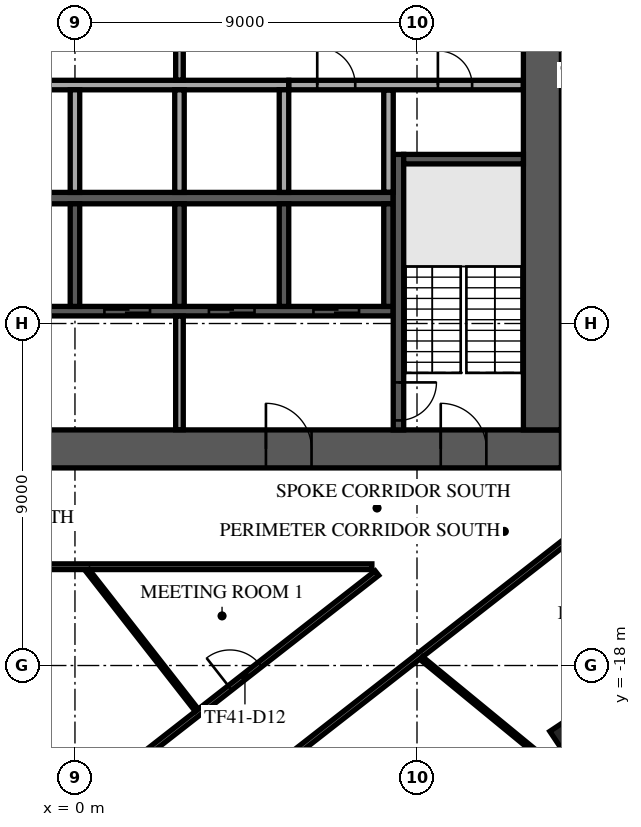
"""IFC4 building model, lengths in metres.
Left out: names, types, materials, properties, quantities, classifications, styles, units other than length and angle.
Written with IfcOpenShell. Run it as: python <this file> out.ifc"""

import sys

from ifc_helpers import new_model, si_unit, direction, frame, frame_2d, origin, origin_2d, place, context, subcontext, project, spatial, rectangle, extrude, element, fill, save


model = new_model("IFC4")
c1 = context("Model", 3, precision=1e-05, world=origin(), true_north=direction((0.0, 1.0)))
c2 = subcontext(c1, "Body", "Model", "MODEL_VIEW")
j1 = project(units=[si_unit("LENGTHUNIT", "METRE"), si_unit("PLANEANGLEUNIT", "RADIAN")], contexts=[c1])
p1 = place(None, origin())
s1 = spatial("IfcSite", under=j1, at=p1, CompositionType="ELEMENT")
p2 = place(p1, origin())
s2 = spatial("IfcBuilding", under=s1, at=p2, CompositionType="ELEMENT")
p3 = place(p2, frame((0.0, 0.0, 175.7)))
s3 = spatial("IfcBuildingStorey", under=s2, at=p3, CompositionType="ELEMENT", Elevation=175.7)
p4 = place(p3, frame((13.258, -19.885, 0.0), z_axis=(0.0, 0.0, 1.0), x_axis=(0.832028680356, 0.55473261583, 0.0)))
e1 = element("IfcColumn", 1, at=p4, inside=s3, PredefinedType="COLUMN", context=c2, shape_type="SweptSolid", body=[
    extrude(rectangle(XDim=1.1, YDim=1.1, at=origin_2d()), origin(), (0.0, 0.0, 1.0), 4.0),
])
p5 = place(p3, frame((-12.8, -12.3, 0.0), z_axis=(0.0, 0.0, 1.0), x_axis=(1.0, 0.0, 0.0)))
e2 = element("IfcWall", 2, at=p5, inside=s3, PredefinedType="SHEAR", context=c2, shape_type="SweptSolid", body=[
    extrude(rectangle(XDim=25.6, YDim=1.0, at=frame_2d((12.8, 0.0))), origin(), (0.0, 0.0, 1.0), 3.6),
])
p6 = place(p5, frame((7.7, 0.0, 0.0)))
e3 = element("IfcOpeningElement", 3, at=p6, cuts=e2, PredefinedType="OPENING", context=c2, shape_type="SweptSolid", body=[
    extrude(rectangle(XDim=2.0, YDim=2.1, at=frame_2d((1.0, 1.05))), frame((0.0, 0.51, 0.0), z_axis=(0.0, -1.0, 0.0), x_axis=(1.0, 0.0, 0.0)), (0.0, 0.0, 1.0), 1.02),
])
p7 = place(p5, frame((17.825, 0.0, 0.0)))
e4 = element("IfcOpeningElement", 4, at=p7, cuts=e2, PredefinedType="OPENING", context=c2, shape_type="SweptSolid", body=[
    extrude(rectangle(XDim=1.2, YDim=2.1, at=frame_2d((0.6, 1.05))), frame((0.0, 0.51, 0.0), z_axis=(0.0, -1.0, 0.0), x_axis=(1.0, 0.0, 0.0)), (0.0, 0.0, 1.0), 1.02),
])
p8 = place(p5, frame((1.975, 0.0, 0.0)))
e5 = element("IfcOpeningElement", 5, at=p8, cuts=e2, PredefinedType="OPENING", context=c2, shape_type="SweptSolid", body=[
    extrude(rectangle(XDim=1.2, YDim=2.1, at=frame_2d((0.6, 1.05))), frame((0.0, 0.51, 0.0), z_axis=(0.0, -1.0, 0.0), x_axis=(1.0, 0.0, 0.0)), (0.0, 0.0, 1.0), 1.02),
])
p9 = place(p5, frame((22.425, 0.0, 0.0)))
e6 = element("IfcOpeningElement", 6, at=p9, cuts=e2, PredefinedType="OPENING", context=c2, shape_type="SweptSolid", body=[
    extrude(rectangle(XDim=1.2, YDim=2.1, at=frame_2d((0.6, 1.05))), frame((0.0, 0.51, 0.0), z_axis=(0.0, -1.0, 0.0), x_axis=(1.0, 0.0, 0.0)), (0.0, 0.0, 1.0), 1.02),
])
p10 = place(p3, frame((12.3, -11.8, 0.0), z_axis=(0.0, 0.0, 1.0), x_axis=(0.0, 1.0, 0.0)))
e7 = element("IfcWall", 7, at=p10, inside=s3, PredefinedType="SHEAR", context=c2, shape_type="SweptSolid", body=[
    extrude(rectangle(XDim=23.6, YDim=1.0, at=frame_2d((11.8, 0.0))), origin(), (0.0, 0.0, 1.0), 3.6),
])
p11 = place(p10, frame((10.6, 0.0, 0.0)))
e8 = element("IfcOpeningElement", 8, at=p11, cuts=e7, PredefinedType="OPENING", context=c2, shape_type="SweptSolid", body=[
    extrude(rectangle(XDim=2.4, YDim=2.4, at=frame_2d((1.2, 1.2))), frame((0.0, 0.51, 0.0), z_axis=(0.0, -1.0, 0.0), x_axis=(1.0, 0.0, 0.0)), (0.0, 0.0, 1.0), 1.02),
])
p12 = place(p3, frame((-2.875, -5.7, 0.0), z_axis=(0.0, 0.0, 1.0), x_axis=(1.0, 0.0, 0.0)))
e9 = element("IfcWall", 9, at=p12, inside=s3, PredefinedType="SOLIDWALL", context=c2, shape_type="SweptSolid", body=[
    extrude(rectangle(XDim=11.25, YDim=0.3, at=frame_2d((5.625, 0.0))), origin(), (0.0, 0.0, 1.0), 3.6),
])
p13 = place(p3, frame((-2.875, -2.725, 0.0), z_axis=(0.0, 0.0, 1.0), x_axis=(1.0, 0.0, 0.0)))
e10 = element("IfcWall", 10, at=p13, inside=s3, PredefinedType="SOLIDWALL", context=c2, shape_type="SweptSolid", body=[
    extrude(rectangle(XDim=8.5, YDim=0.25, at=frame_2d((4.25, 0.0))), origin(), (0.0, 0.0, 1.0), 3.6),
])
for number, where, z_axis, x_axis in (
    (11, (0.0, -5.55, 0.0), (0.0, 0.0, 1.0), (0.0, 1.0, 0.0)),
    (12, (2.75, -5.55, 0.0), (0.0, 0.0, 1.0), (0.0, 1.0, 0.0)),
    (13, (5.5, -5.55, 0.0), (0.0, 0.0, 1.0), (0.0, 1.0, 0.0)),
):
    element("IfcWall", number, at=place(p3, frame(where, z_axis=z_axis, x_axis=x_axis)), inside=s3, PredefinedType="SOLIDWALL", context=c2, shape_type="SweptSolid", body=[
        extrude(rectangle(XDim=2.7, YDim=0.25, at=frame_2d((1.35, 0.0))), origin(), (0.0, 0.0, 1.0), 3.6),
    ])
p14 = place(p3, frame((-2.875, -8.675, 0.0), z_axis=(0.0, 0.0, 1.0), x_axis=(1.0, 0.0, 0.0)))
e14 = element("IfcWall", 14, at=p14, inside=s3, PredefinedType="SOLIDWALL", context=c2, shape_type="SweptSolid", body=[
    extrude(rectangle(XDim=11.25, YDim=0.25, at=frame_2d((5.625, 0.0))), origin(), (0.0, 0.0, 1.0), 3.6),
])
p15 = place(p14, frame((0.9, 0.0, 0.0)))
e15 = element("IfcOpeningElement", 15, at=p15, cuts=e14, PredefinedType="OPENING", context=c2, shape_type="SweptSolid", body=[
    extrude(rectangle(XDim=1.2, YDim=2.1, at=frame_2d((0.6, 1.05))), frame((0.0, 0.135, 0.0), z_axis=(0.0, -1.0, 0.0), x_axis=(1.0, 0.0, 0.0)), (0.0, 0.0, 1.0), 0.27),
])
p16 = place(p14, frame((3.65, 0.0, 0.0)))
e16 = element("IfcOpeningElement", 16, at=p16, cuts=e14, PredefinedType="OPENING", context=c2, shape_type="SweptSolid", body=[
    extrude(rectangle(XDim=1.2, YDim=2.1, at=frame_2d((0.6, 1.05))), frame((0.0, 0.135, 0.0), z_axis=(0.0, -1.0, 0.0), x_axis=(1.0, 0.0, 0.0)), (0.0, 0.0, 1.0), 0.27),
])
p17 = place(p14, frame((6.4, 0.0, 0.0)))
e17 = element("IfcOpeningElement", 17, at=p17, cuts=e14, PredefinedType="OPENING", context=c2, shape_type="SweptSolid", body=[
    extrude(rectangle(XDim=1.2, YDim=2.1, at=frame_2d((0.6, 1.05))), frame((0.0, 0.135, 0.0), z_axis=(0.0, -1.0, 0.0), x_axis=(1.0, 0.0, 0.0)), (0.0, 0.0, 1.0), 0.27),
])
p18 = place(p14, frame((9.15, 0.0, 0.0)))
e18 = element("IfcOpeningElement", 18, at=p18, cuts=e14, PredefinedType="OPENING", context=c2, shape_type="SweptSolid", body=[
    extrude(rectangle(XDim=1.2, YDim=2.1, at=frame_2d((0.6, 1.05))), frame((0.0, 0.135, 0.0), z_axis=(0.0, -1.0, 0.0), x_axis=(1.0, 0.0, 0.0)), (0.0, 0.0, 1.0), 0.27),
])
for number, where, z_axis, x_axis in (
    (19, (0.0, -8.55, 0.0), (0.0, 0.0, 1.0), (0.0, 1.0, 0.0)),
    (20, (2.75, -8.55, 0.0), (0.0, 0.0, 1.0), (0.0, 1.0, 0.0)),
    (21, (5.5, -8.55, 0.0), (0.0, 0.0, 1.0), (0.0, 1.0, 0.0)),
    (22, (8.25, -8.55, 0.0), (0.0, 0.0, 1.0), (0.0, 1.0, 0.0)),
):
    element("IfcWall", number, at=place(p3, frame(where, z_axis=z_axis, x_axis=x_axis)), inside=s3, PredefinedType="SOLIDWALL", context=c2, shape_type="SweptSolid", body=[
        extrude(rectangle(XDim=2.7, YDim=0.25, at=frame_2d((1.35, 0.0))), origin(), (0.0, 0.0, 1.0), 3.6),
    ])
p19 = place(p3, frame((8.512, -4.55, 0.0), z_axis=(0.0, 0.0, 1.0), x_axis=(0.0, -1.0, 0.0)))
e23 = element("IfcWall", 23, at=p19, inside=s3, PredefinedType="SOLIDWALL", context=c2, shape_type="SweptSolid", body=[
    extrude(rectangle(XDim=7.25, YDim=0.275, at=frame_2d((3.625, 0.0))), origin(), (0.0, 0.0, 1.0), 3.6),
])
p20 = place(p19, frame((6.0, 0.0, 0.0)))
e24 = element("IfcOpeningElement", 24, at=p20, cuts=e23, PredefinedType="OPENING", context=c2, shape_type="SweptSolid", body=[
    extrude(rectangle(XDim=1.0, YDim=2.1, at=frame_2d((0.5, 1.05))), frame((0.0, 0.147, 0.0), z_axis=(0.0, -1.0, 0.0), x_axis=(1.0, 0.0, 0.0)), (0.0, 0.0, 1.0), 0.295),
])
p21 = place(p3, frame((8.65, -4.675, 0.0), z_axis=(0.0, 0.0, 1.0), x_axis=(1.0, 0.0, 0.0)))
e25 = element("IfcWall", 25, at=p21, inside=s3, PredefinedType="SOLIDWALL", context=c2, shape_type="SweptSolid", body=[
    extrude(rectangle(XDim=3.15, YDim=0.25, at=frame_2d((1.575, 0.0))), origin(), (0.0, 0.0, 1.0), 3.6),
])
p22 = place(p3, frame((2.75, -11.795, 0.0), z_axis=(0.0, 0.0, 1.0), x_axis=(0.0, 1.0, 0.0)))
e26 = element("IfcWall", 26, at=p22, inside=s3, PredefinedType="PARTITIONING", context=c2, shape_type="SweptSolid", body=[
    extrude(rectangle(XDim=2.99, YDim=0.2, at=frame_2d((1.495, 0.0))), origin(), (0.0, 0.0, 1.0), 3.6),
])
p23 = place(p3, frame((8.25, -5.545, 0.0), z_axis=(0.0, 0.0, 1.0), x_axis=(0.0, 1.0, 0.0)))
e27 = element("IfcWall", 27, at=p23, inside=s3, PredefinedType="PARTITIONING", context=c2, shape_type="SweptSolid", body=[
    extrude(rectangle(XDim=2.69, YDim=0.25, at=frame_2d((1.345, 0.0))), origin(), (0.0, 0.0, 1.0), 3.6),
])
p24 = place(p3, frame((5.63, -2.725, 0.0), z_axis=(0.0, 0.0, 1.0), x_axis=(1.0, 0.0, 0.0)))
e28 = element("IfcWall", 28, at=p24, inside=s3, PredefinedType="PARTITIONING", context=c2, shape_type="SweptSolid", body=[
    extrude(rectangle(XDim=6.165, YDim=0.25, at=frame_2d((3.083, 0.0))), origin(), (0.0, 0.0, 1.0), 3.6),
])
p25 = place(p24, frame((0.745, 0.0, 0.0)))
e29 = element("IfcOpeningElement", 29, at=p25, cuts=e28, PredefinedType="OPENING", context=c2, shape_type="SweptSolid", body=[
    extrude(rectangle(XDim=1.0, YDim=2.1, at=frame_2d((0.5, 1.05))), frame((0.0, 0.135, 0.0), z_axis=(0.0, -1.0, 0.0), x_axis=(1.0, 0.0, 0.0)), (0.0, 0.0, 1.0), 0.27),
])
p26 = place(p24, frame((3.92, 0.0, 0.0)))
e30 = element("IfcOpeningElement", 30, at=p26, cuts=e28, PredefinedType="OPENING", context=c2, shape_type="SweptSolid", body=[
    extrude(rectangle(XDim=0.9, YDim=2.1, at=frame_2d((0.45, 1.05))), frame((0.0, 0.135, 0.0), z_axis=(0.0, -1.0, 0.0), x_axis=(1.0, 0.0, 0.0)), (0.0, 0.0, 1.0), 0.27),
])
p27 = place(p3, frame((2.75, -2.595, 0.0), z_axis=(0.0, 0.0, 1.0), x_axis=(0.0, 1.0, 0.0)))
e31 = element("IfcWall", 31, at=p27, inside=s3, PredefinedType="PARTITIONING", context=c2, shape_type="SweptSolid", body=[
    extrude(rectangle(XDim=5.19, YDim=0.2, at=frame_2d((2.595, 0.0))), origin(), (0.0, 0.0, 1.0), 3.6),
])
p28 = place(p27, frame((1.395, 0.0, 0.0)))
e32 = element("IfcOpeningElement", 32, at=p28, cuts=e31, PredefinedType="OPENING", context=c2, shape_type="SweptSolid", body=[
    extrude(rectangle(XDim=2.4, YDim=2.4, at=frame_2d((1.2, 1.2))), frame((0.0, 0.11, 0.0), z_axis=(0.0, -1.0, 0.0), x_axis=(1.0, 0.0, 0.0)), (0.0, 0.0, 1.0), 0.22),
])
p29 = place(p3, frame((-3.534, -35.882, 0.0), z_axis=(0.0, 0.0, 1.0), x_axis=(0.788011205374, 0.61566089709, 0.0)))
e33 = element("IfcWall", 33, at=p29, inside=s3, PredefinedType="STANDARD", context=c2, shape_type="SweptSolid", body=[
    extrude(rectangle(XDim=49.752, YDim=0.6, at=frame_2d((24.876, 0.0))), origin(), (0.0, 0.0, 1.0), 3.6),
])
p30 = place(p29, frame((1.161, 0.0, 0.9)))
e34 = element("IfcOpeningElement", 34, at=p30, cuts=e33, PredefinedType="OPENING", context=c2, shape_type="SweptSolid", body=[
    extrude(rectangle(XDim=2.1, YDim=2.1, at=frame_2d((1.05, 1.05))), frame((0.0, 0.31, 0.0), z_axis=(0.0, -1.0, 0.0), x_axis=(1.0, 0.0, 0.0)), (0.0, 0.0, 1.0), 0.62),
])
p31 = place(p29, frame((5.644, 0.0, 0.9)))
e35 = element("IfcOpeningElement", 35, at=p31, cuts=e33, PredefinedType="OPENING", context=c2, shape_type="SweptSolid", body=[
    extrude(rectangle(XDim=2.1, YDim=2.1, at=frame_2d((1.05, 1.05))), frame((0.0, 0.31, 0.0), z_axis=(0.0, -1.0, 0.0), x_axis=(1.0, 0.0, 0.0)), (0.0, 0.0, 1.0), 0.62),
])
p32 = place(p29, frame((10.189, 0.0, 0.9)))
e36 = element("IfcOpeningElement", 36, at=p32, cuts=e33, PredefinedType="OPENING", context=c2, shape_type="SweptSolid", body=[
    extrude(rectangle(XDim=2.1, YDim=2.1, at=frame_2d((1.05, 1.05))), frame((0.0, 0.31, 0.0), z_axis=(0.0, -1.0, 0.0), x_axis=(1.0, 0.0, 0.0)), (0.0, 0.0, 1.0), 0.62),
])
p33 = place(p29, frame((14.735, 0.0, 0.9)))
e37 = element("IfcOpeningElement", 37, at=p33, cuts=e33, PredefinedType="OPENING", context=c2, shape_type="SweptSolid", body=[
    extrude(rectangle(XDim=2.1, YDim=2.1, at=frame_2d((1.05, 1.05))), frame((0.0, 0.31, 0.0), z_axis=(0.0, -1.0, 0.0), x_axis=(1.0, 0.0, 0.0)), (0.0, 0.0, 1.0), 0.62),
])
p34 = place(p29, frame((19.28, 0.0, 0.9)))
e38 = element("IfcOpeningElement", 38, at=p34, cuts=e33, PredefinedType="OPENING", context=c2, shape_type="SweptSolid", body=[
    extrude(rectangle(XDim=2.1, YDim=2.1, at=frame_2d((1.05, 1.05))), frame((0.0, 0.31, 0.0), z_axis=(0.0, -1.0, 0.0), x_axis=(1.0, 0.0, 0.0)), (0.0, 0.0, 1.0), 0.62),
])
p35 = place(p29, frame((23.826, 0.0, 0.9)))
e39 = element("IfcOpeningElement", 39, at=p35, cuts=e33, PredefinedType="OPENING", context=c2, shape_type="SweptSolid", body=[
    extrude(rectangle(XDim=2.1, YDim=2.1, at=frame_2d((1.05, 1.05))), frame((0.0, 0.31, 0.0), z_axis=(0.0, -1.0, 0.0), x_axis=(1.0, 0.0, 0.0)), (0.0, 0.0, 1.0), 0.62),
])
p36 = place(p29, frame((28.371, 0.0, 0.9)))
e40 = element("IfcOpeningElement", 40, at=p36, cuts=e33, PredefinedType="OPENING", context=c2, shape_type="SweptSolid", body=[
    extrude(rectangle(XDim=2.1, YDim=2.1, at=frame_2d((1.05, 1.05))), frame((0.0, 0.31, 0.0), z_axis=(0.0, -1.0, 0.0), x_axis=(1.0, 0.0, 0.0)), (0.0, 0.0, 1.0), 0.62),
])
p37 = place(p29, frame((32.917, 0.0, 0.9)))
e41 = element("IfcOpeningElement", 41, at=p37, cuts=e33, PredefinedType="OPENING", context=c2, shape_type="SweptSolid", body=[
    extrude(rectangle(XDim=2.1, YDim=2.1, at=frame_2d((1.05, 1.05))), frame((0.0, 0.31, 0.0), z_axis=(0.0, -1.0, 0.0), x_axis=(1.0, 0.0, 0.0)), (0.0, 0.0, 1.0), 0.62),
])
p38 = place(p29, frame((37.462, 0.0, 0.9)))
e42 = element("IfcOpeningElement", 42, at=p38, cuts=e33, PredefinedType="OPENING", context=c2, shape_type="SweptSolid", body=[
    extrude(rectangle(XDim=2.1, YDim=2.1, at=frame_2d((1.05, 1.05))), frame((0.0, 0.31, 0.0), z_axis=(0.0, -1.0, 0.0), x_axis=(1.0, 0.0, 0.0)), (0.0, 0.0, 1.0), 0.62),
])
p39 = place(p29, frame((42.008, 0.0, 0.9)))
e43 = element("IfcOpeningElement", 43, at=p39, cuts=e33, PredefinedType="OPENING", context=c2, shape_type="SweptSolid", body=[
    extrude(rectangle(XDim=2.1, YDim=2.1, at=frame_2d((1.05, 1.05))), frame((0.0, 0.31, 0.0), z_axis=(0.0, -1.0, 0.0), x_axis=(1.0, 0.0, 0.0)), (0.0, 0.0, 1.0), 0.62),
])
p40 = place(p29, frame((46.491, 0.0, 0.9)))
e44 = element("IfcOpeningElement", 44, at=p40, cuts=e33, PredefinedType="OPENING", context=c2, shape_type="SweptSolid", body=[
    extrude(rectangle(XDim=2.1, YDim=2.1, at=frame_2d((1.05, 1.05))), frame((0.0, 0.31, 0.0), z_axis=(0.0, -1.0, 0.0), x_axis=(1.0, 0.0, 0.0)), (0.0, 0.0, 1.0), 0.62),
])
p41 = place(p3, frame((-14.312, -15.4, 0.0), z_axis=(0.0, 0.0, 1.0), x_axis=(1.0, 0.0, 0.0)))
e45 = element("IfcWall", 45, at=p41, inside=s3, PredefinedType="PARTITIONING", context=c2, shape_type="SweptSolid", body=[
    extrude(rectangle(XDim=22.125, YDim=0.15, at=frame_2d((11.062, 0.0))), origin(), (0.0, 0.0, 1.0), 3.15),
])
p42 = place(p3, frame((-1.825, -23.203, 0.0), z_axis=(0.0, 0.0, 1.0), x_axis=(0.788016612455, 0.615653976269, 0.0)))
e46 = element("IfcWall", 46, at=p42, inside=s3, PredefinedType="PARTITIONING", context=c2, shape_type="SweptSolid", body=[
    extrude(rectangle(XDim=12.399, YDim=0.15, at=frame_2d((6.2, 0.0))), origin(), (0.0, 0.0, 1.0), 3.15),
])
p43 = place(p42, frame((7.492, 0.0, 0.0)))
e47 = element("IfcOpeningElement", 47, at=p43, cuts=e46, PredefinedType="OPENING", context=c2, shape_type="SweptSolid", body=[
    extrude(rectangle(XDim=1.0, YDim=2.1, at=frame_2d((0.5, 1.05))), frame((0.0, 0.085, 0.0), z_axis=(0.0, -1.0, 0.0), x_axis=(1.0, 0.0, 0.0)), (0.0, 0.0, 1.0), 0.17),
])
p44 = place(p3, frame((-0.348, -25.095, 0.0), z_axis=(0.0, 0.0, 1.0), x_axis=(0.788010131951, 0.615662271008, 0.0)))
e48 = element("IfcWall", 48, at=p44, inside=s3, PredefinedType="PARTITIONING", context=c2, shape_type="SweptSolid", body=[
    extrude(rectangle(XDim=31.448, YDim=0.15, at=frame_2d((15.724, 0.0))), origin(), (0.0, 0.0, 1.0), 3.15),
])
p45 = place(p44, frame((4.801, 0.0, 0.0)))
e49 = element("IfcOpeningElement", 49, at=p45, cuts=e48, PredefinedType="OPENING", context=c2, shape_type="SweptSolid", body=[
    extrude(rectangle(XDim=1.8, YDim=2.1, at=frame_2d((0.9, 1.05))), frame((0.0, 0.085, 0.0), z_axis=(0.0, -1.0, 0.0), x_axis=(1.0, 0.0, 0.0)), (0.0, 0.0, 1.0), 0.17),
])
p46 = place(p44, frame((0.301, 0.0, 0.0)))
e50 = element("IfcOpeningElement", 50, at=p46, cuts=e48, PredefinedType="OPENING", context=c2, shape_type="SweptSolid", body=[
    extrude(rectangle(XDim=1.0, YDim=2.1, at=frame_2d((0.5, 1.05))), frame((0.0, 0.085, 0.0), z_axis=(0.0, -1.0, 0.0), x_axis=(1.0, 0.0, 0.0)), (0.0, 0.0, 1.0), 0.17),
])
p47 = place(p44, frame((19.226, 0.0, 0.0)))
e51 = element("IfcOpeningElement", 51, at=p47, cuts=e48, PredefinedType="OPENING", context=c2, shape_type="SweptSolid", body=[
    extrude(rectangle(XDim=1.0, YDim=2.1, at=frame_2d((0.5, 1.05))), frame((0.0, 0.085, 0.0), z_axis=(0.0, -1.0, 0.0), x_axis=(1.0, 0.0, 0.0)), (0.0, 0.0, 1.0), 0.17),
])
p48 = place(p44, frame((30.072, 0.0, 0.0)))
e52 = element("IfcOpeningElement", 52, at=p48, cuts=e48, PredefinedType="OPENING", context=c2, shape_type="SweptSolid", body=[
    extrude(rectangle(XDim=1.0, YDim=2.1, at=frame_2d((0.5, 1.05))), frame((0.0, 0.085, 0.0), z_axis=(0.0, -1.0, 0.0), x_axis=(1.0, 0.0, 0.0)), (0.0, 0.0, 1.0), 0.17),
])
p49 = place(p3, frame((0.337, -15.506, 0.0), z_axis=(0.0, 0.0, 1.0), x_axis=(0.615683690883, -0.787993396407, 0.0)))
e53 = element("IfcWall", 53, at=p49, inside=s3, PredefinedType="PARTITIONING", context=c2, shape_type="SweptSolid", body=[
    extrude(rectangle(XDim=4.66, YDim=0.1, at=frame_2d((2.33, 0.0))), origin(), (0.0, 0.0, 1.0), 3.15),
])
p50 = place(p3, frame((9.118, -17.809, 0.0), z_axis=(0.0, 0.0, 1.0), x_axis=(0.772739146609, -0.634723728324, 0.0)))
e54 = element("IfcWall", 54, at=p50, inside=s3, PredefinedType="PARTITIONING", context=c2, shape_type="SweptSolid", body=[
    extrude(rectangle(XDim=6.303, YDim=0.1, at=frame_2d((3.151, 0.0))), origin(), (0.0, 0.0, 1.0), 2.9),
])
p51 = place(p7, origin())
e55 = element("IfcDoor", 55, at=p51, inside=s3, OperationType="SINGLE_SWING_LEFT", PredefinedType="DOOR", context=c2, shape_type="SweptSolid", body=[
    extrude(rectangle(XDim=1.2, YDim=2.1, at=frame_2d((0.6, 1.05))), frame((0.0, 0.025, 0.0), z_axis=(0.0, -1.0, 0.0), x_axis=(1.0, 0.0, 0.0)), (0.0, 0.0, 1.0), 0.05),
])
fill(e4, e55)
p52 = place(p9, origin())
e56 = element("IfcDoor", 56, at=p52, inside=s3, OperationType="SINGLE_SWING_LEFT", PredefinedType="DOOR", context=c2, shape_type="SweptSolid", body=[
    extrude(rectangle(XDim=1.2, YDim=2.1, at=frame_2d((0.6, 1.05))), frame((0.0, 0.025, 0.0), z_axis=(0.0, -1.0, 0.0), x_axis=(1.0, 0.0, 0.0)), (0.0, 0.0, 1.0), 0.05),
])
fill(e6, e56)
p53 = place(p16, origin())
e57 = element("IfcDoor", 57, at=p53, inside=s3, OperationType="DOUBLE_DOOR_SLIDING", PredefinedType="DOOR", context=c2, shape_type="SweptSolid", body=[
    extrude(rectangle(XDim=1.2, YDim=2.1, at=frame_2d((0.6, 1.05))), frame((0.0, 0.025, 0.0), z_axis=(0.0, -1.0, 0.0), x_axis=(1.0, 0.0, 0.0)), (0.0, 0.0, 1.0), 0.05),
])
fill(e16, e57)
p54 = place(p17, origin())
e58 = element("IfcDoor", 58, at=p54, inside=s3, OperationType="DOUBLE_DOOR_SLIDING", PredefinedType="DOOR", context=c2, shape_type="SweptSolid", body=[
    extrude(rectangle(XDim=1.2, YDim=2.1, at=frame_2d((0.6, 1.05))), frame((0.0, 0.025, 0.0), z_axis=(0.0, -1.0, 0.0), x_axis=(1.0, 0.0, 0.0)), (0.0, 0.0, 1.0), 0.05),
])
fill(e17, e58)
p55 = place(p18, origin())
e59 = element("IfcDoor", 59, at=p55, inside=s3, OperationType="DOUBLE_DOOR_SLIDING", PredefinedType="DOOR", context=c2, shape_type="SweptSolid", body=[
    extrude(rectangle(XDim=1.2, YDim=2.1, at=frame_2d((0.6, 1.05))), frame((0.0, 0.025, 0.0), z_axis=(0.0, -1.0, 0.0), x_axis=(1.0, 0.0, 0.0)), (0.0, 0.0, 1.0), 0.05),
])
fill(e18, e59)
p56 = place(p20, origin())
e60 = element("IfcDoor", 60, at=p56, inside=s3, OperationType="SINGLE_SWING_LEFT", PredefinedType="DOOR", context=c2, shape_type="SweptSolid", body=[
    extrude(rectangle(XDim=1.0, YDim=2.1, at=frame_2d((0.5, 1.05))), frame((0.0, 0.025, 0.0), z_axis=(0.0, -1.0, 0.0), x_axis=(1.0, 0.0, 0.0)), (0.0, 0.0, 1.0), 0.05),
])
fill(e24, e60)
p57 = place(p25, origin())
e61 = element("IfcDoor", 61, at=p57, inside=s3, OperationType="SINGLE_SWING_RIGHT", PredefinedType="DOOR", context=c2, shape_type="SweptSolid", body=[
    extrude(rectangle(XDim=1.0, YDim=2.1, at=frame_2d((0.5, 1.05))), frame((0.0, 0.025, 0.0), z_axis=(0.0, -1.0, 0.0), x_axis=(1.0, 0.0, 0.0)), (0.0, 0.0, 1.0), 0.05),
])
fill(e29, e61)
p58 = place(p26, origin())
e62 = element("IfcDoor", 62, at=p58, inside=s3, OperationType="SINGLE_SWING_RIGHT", PredefinedType="DOOR", context=c2, shape_type="SweptSolid", body=[
    extrude(rectangle(XDim=0.9, YDim=2.1, at=frame_2d((0.45, 1.05))), frame((0.0, 0.025, 0.0), z_axis=(0.0, -1.0, 0.0), x_axis=(1.0, 0.0, 0.0)), (0.0, 0.0, 1.0), 0.05),
])
fill(e30, e62)
p59 = place(p43, origin())
e63 = element("IfcDoor", 63, at=p59, inside=s3, OperationType="SINGLE_SWING_LEFT", PredefinedType="DOOR", context=c2, shape_type="SweptSolid", body=[
    extrude(rectangle(XDim=1.0, YDim=2.1, at=frame_2d((0.5, 1.05))), frame((0.0, 0.025, 0.0), z_axis=(0.0, -1.0, 0.0), x_axis=(1.0, 0.0, 0.0)), (0.0, 0.0, 1.0), 0.05),
])
fill(e47, e63)
save(model, sys.argv[1])
